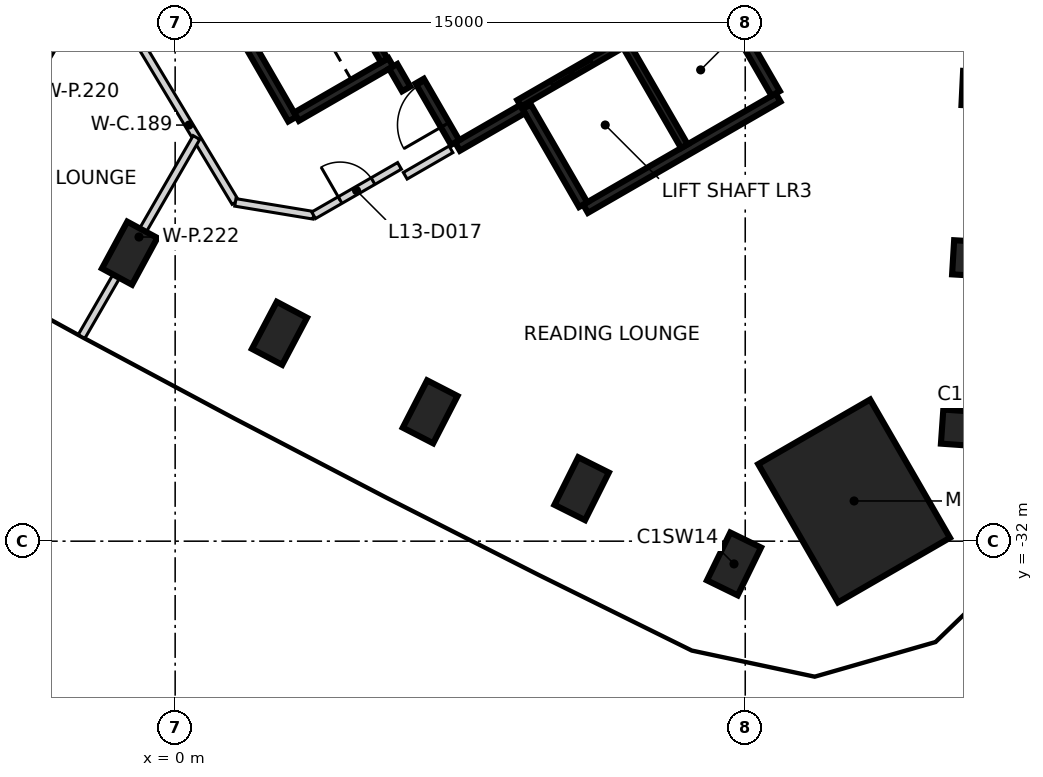
"""IFC4 building model, lengths in metres.
Left out: names, types, materials, properties, quantities, classifications, styles, units other than length and angle.
Written with IfcOpenShell. Run it as: python <this file> out.ifc"""

import sys

from ifc_helpers import new_model, si_unit, direction, frame, frame_2d, origin, origin_2d, place, context, subcontext, project, spatial, rectangle, extrude, element, fill, save


model = new_model("IFC4")
c1 = context("Model", 3, precision=1e-05, world=origin(), true_north=direction((0.0, 1.0)))
c2 = subcontext(c1, "Body", "Model", "MODEL_VIEW")
j1 = project(units=[si_unit("LENGTHUNIT", "METRE"), si_unit("PLANEANGLEUNIT", "RADIAN")], contexts=[c1])
p1 = place(None, origin())
s1 = spatial("IfcSite", under=j1, at=p1, CompositionType="ELEMENT")
p2 = place(p1, origin())
s2 = spatial("IfcBuilding", under=s1, at=p2, CompositionType="ELEMENT")
p3 = place(p2, frame((0.0, 0.0, 60.2)))
s3 = spatial("IfcBuildingStorey", under=s2, at=p3, CompositionType="ELEMENT", Elevation=60.2)
for number, where, z_axis, x_axis in (
    (1, (20.879, -29.034, -0.475), (0.0, 0.0, 1.0), (-0.998, 0.07, 0.0)),
    (2, (21.169, -24.573, -0.475), (0.0, 0.0, 1.0), (-0.998, 0.06, 0.0)),
    (3, (21.41, -20.109, -0.475), (0.0, 0.0, 1.0), (-0.999, 0.048, 0.0)),
    (4, (-1.197, -24.423, -0.475), (0.0, 0.0, 1.0), (0.476, 0.879, 0.0)),
    (5, (2.745, -26.531, -0.475), (0.0, 0.0, 1.0), (0.467, 0.884, 0.0)),
    (6, (6.71, -28.596, -0.475), (0.0, 0.0, 1.0), (0.458, 0.889, 0.0)),
    (7, (10.696, -30.619, -0.475), (0.0, 0.0, 1.0), (0.447, 0.894, 0.0)),
    (8, (14.705, -32.599, -0.475), (0.0, 0.0, 1.0), (0.438, 0.899, 0.0)),
):
    element("IfcColumn", number, at=place(p3, frame(where, z_axis=z_axis, x_axis=x_axis)), inside=s3, PredefinedType="COLUMN", context=c2, shape_type="SweptSolid", body=[
        extrude(rectangle(XDim=1.4, YDim=0.9, at=origin_2d()), origin(), (0.0, 0.0, 1.0), 3.6),
    ])
p4 = place(p3, frame((17.865, -30.942, -0.475), z_axis=(0.0, 0.0, 1.0), x_axis=(-0.5, 0.866025403784, 0.0)))
e9 = element("IfcColumn", 9, at=p4, inside=s3, PredefinedType="COLUMN", context=c2, shape_type="SweptSolid", body=[
    extrude(rectangle(XDim=4.2, YDim=3.4, at=origin_2d()), origin(), (0.0, 0.0, 1.0), 3.6),
])
p5 = place(p3, frame((15.865, -20.328, 0.0), z_axis=(0.0, 0.0, 1.0), x_axis=(-0.86602852612, -0.499994591916, 0.0)))
e10 = element("IfcWall", 10, at=p5, inside=s3, PredefinedType="SHEAR", context=c2, shape_type="SweptSolid", body=[
    extrude(rectangle(XDim=5.85, YDim=0.25, at=frame_2d((2.925, 0.0))), origin(), (0.0, 0.0, 1.0), 3.125),
])
for number, where, z_axis, x_axis in (
    (11, (14.315, -17.644, 0.0), (0.0, 0.0, 1.0), (0.5, -0.866, 0.0)),
    (12, (10.736, -23.145, 0.0), (0.0, 0.0, 1.0), (-0.5, 0.866, 0.0)),
):
    element("IfcWall", number, at=place(p3, frame(where, z_axis=z_axis, x_axis=x_axis)), inside=s3, PredefinedType="SHEAR", context=c2, shape_type="SweptSolid", body=[
        extrude(rectangle(XDim=2.974, YDim=0.25, at=frame_2d((1.487, 0.0))), origin(), (0.0, 0.0, 1.0), 3.125),
    ])
p6 = place(p3, frame((3.085, -20.894, 0.0), z_axis=(0.0, 0.0, 1.0), x_axis=(-0.499978833458, 0.866037623948, 0.0)))
e13 = element("IfcWall", 13, at=p6, inside=s3, PredefinedType="SHEAR", context=c2, shape_type="SweptSolid", body=[
    extrude(rectangle(XDim=3.05, YDim=0.25, at=frame_2d((1.525, 0.0))), origin(), (0.0, 0.0, 1.0), 3.125),
])
p7 = place(p3, frame((5.675, -19.399, 0.0), z_axis=(0.0, 0.0, 1.0), x_axis=(-0.866026637627, -0.499997862916, 0.0)))
e14 = element("IfcWall", 14, at=p7, inside=s3, PredefinedType="SHEAR", context=c2, shape_type="SweptSolid", body=[
    extrude(rectangle(XDim=2.865, YDim=0.25, at=frame_2d((1.432, 0.0))), origin(), (0.0, 0.0, 1.0), 3.125),
])
p8 = place(p3, frame((9.14, -20.631, 0.0), z_axis=(0.0, 0.0, 1.0), x_axis=(-0.866043531843, -0.499968599967, 0.0)))
e15 = element("IfcWall", 15, at=p8, inside=s3, PredefinedType="SHEAR", context=c2, shape_type="SweptSolid", body=[
    extrude(rectangle(XDim=1.975, YDim=0.25, at=frame_2d((0.987, 0.0))), origin(), (0.0, 0.0, 1.0), 3.125),
])
p9 = place(p3, frame((7.367, -21.51, 0.0), z_axis=(0.0, 0.0, 1.0), x_axis=(-0.499983108224, 0.866035156036, 0.0)))
e16 = element("IfcWall", 16, at=p9, inside=s3, PredefinedType="SHEAR", context=c2, shape_type="SweptSolid", body=[
    extrude(rectangle(XDim=1.865, YDim=0.25, at=frame_2d((0.932, 0.0))), origin(), (0.0, 0.0, 1.0), 3.125),
])
p10 = place(p9, frame((0.535, 0.0, 0.0)))
e17 = element("IfcOpeningElement", 17, at=p10, cuts=e16, PredefinedType="OPENING", context=c2, shape_type="SweptSolid", body=[
    extrude(rectangle(XDim=1.25, YDim=2.1, at=frame_2d((0.625, 1.05))), frame((0.0, 0.135, 0.0), z_axis=(0.0, -1.0, 0.0), x_axis=(1.0, 0.0, 0.0)), (0.0, 0.0, 1.0), 0.27),
])
p11 = place(p3, frame((6.08, -20.1, 0.0), z_axis=(0.0, 0.0, 1.0), x_axis=(-0.500051773299, 0.865995510393, 0.0)))
e18 = element("IfcWall", 18, at=p11, inside=s3, PredefinedType="SHEAR", context=c2, shape_type="SweptSolid", body=[
    extrude(rectangle(XDim=0.685, YDim=0.25, at=frame_2d((0.342, 0.0))), origin(), (0.0, 0.0, 1.0), 3.125),
])
p12 = place(p3, frame((9.052, -20.48, 0.0), z_axis=(0.0, 0.0, 1.0), x_axis=(0.866030299012, 0.499991521122, 0.0)))
e19 = element("IfcWall", 19, at=p12, inside=s3, PredefinedType="SHEAR", context=c2, shape_type="SweptSolid", body=[
    extrude(rectangle(XDim=6.1, YDim=0.2, at=frame_2d((3.05, 0.0))), origin(), (0.0, 0.0, 1.0), 3.125),
])
p13 = place(p12, frame((1.0, 0.0, 0.0)))
e20 = element("IfcOpeningElement", 20, at=p13, cuts=e19, PredefinedType="OPENING", context=c2, shape_type="SweptSolid", body=[
    extrude(rectangle(XDim=1.2, YDim=2.1, at=frame_2d((0.6, 1.05))), frame((0.0, 0.11, 0.0), z_axis=(0.0, -1.0, 0.0), x_axis=(1.0, 0.0, 0.0)), (0.0, 0.0, 1.0), 0.22),
])
p14 = place(p12, frame((4.05, 0.0, 0.0)))
e21 = element("IfcOpeningElement", 21, at=p14, cuts=e19, PredefinedType="OPENING", context=c2, shape_type="SweptSolid", body=[
    extrude(rectangle(XDim=1.2, YDim=2.1, at=frame_2d((0.6, 1.05))), frame((0.0, 0.11, 0.0), z_axis=(0.0, -1.0, 0.0), x_axis=(1.0, 0.0, 0.0)), (0.0, 0.0, 1.0), 0.22),
])
p15 = place(p3, frame((11.875, -18.967, 0.0), z_axis=(0.0, 0.0, 1.0), x_axis=(0.49998131003, -0.866036194175, 0.0)))
e22 = element("IfcWall", 22, at=p15, inside=s3, PredefinedType="SHEAR", context=c2, shape_type="SweptSolid", body=[
    extrude(rectangle(XDim=3.048, YDim=0.2, at=frame_2d((1.524, 0.0))), origin(), (0.0, 0.0, 1.0), 3.125),
])
p16 = place(p3, frame((5.503, -19.352, 0.0), z_axis=(0.0, 0.0, 1.0), x_axis=(-0.499986818241, 0.866033014143, 0.0)))
e23 = element("IfcWall", 23, at=p16, inside=s3, PredefinedType="SHEAR", context=c2, shape_type="SweptSolid", body=[
    extrude(rectangle(XDim=2.798, YDim=0.2, at=frame_2d((1.399, 0.0))), origin(), (0.0, 0.0, 1.0), 3.125),
])
p17 = place(p16, frame((0.949, 0.0, 0.0)))
e24 = element("IfcOpeningElement", 24, at=p17, cuts=e23, PredefinedType="OPENING", context=c2, shape_type="SweptSolid", body=[
    extrude(rectangle(XDim=0.9, YDim=2.1, at=frame_2d((0.45, 1.05))), frame((0.0, 0.11, 0.0), z_axis=(0.0, -1.0, 0.0), x_axis=(1.0, 0.0, 0.0)), (0.0, 0.0, 1.0), 0.22),
])
p18 = place(p3, frame((-0.858, -19.017, 0.0), z_axis=(0.0, 0.0, 1.0), x_axis=(0.514647068805, -0.857402119528, 0.0)))
e25 = element("IfcWall", 25, at=p18, inside=s3, PredefinedType="PARTITIONING", context=c2, shape_type="SweptSolid", body=[
    extrude(rectangle(XDim=4.745, YDim=0.2, at=frame_2d((2.373, 0.0))), origin(), (0.0, 0.0, 1.0), 3.125),
])
p19 = place(p3, frame((1.584, -23.086, 0.0), z_axis=(0.0, 0.0, 1.0), x_axis=(0.986633159246, -0.162957077405, 0.0)))
e26 = element("IfcWall", 26, at=p19, inside=s3, PredefinedType="PARTITIONING", context=c2, shape_type="SweptSolid", body=[
    extrude(rectangle(XDim=2.087, YDim=0.2, at=frame_2d((1.043, 0.0))), origin(), (0.0, 0.0, 1.0), 3.125),
])
p20 = place(p3, frame((3.643, -23.426, 0.0), z_axis=(0.0, 0.0, 1.0), x_axis=(0.866654350985, 0.498909045738, 0.0)))
e27 = element("IfcWall", 27, at=p20, inside=s3, PredefinedType="PARTITIONING", context=c2, shape_type="SweptSolid", body=[
    extrude(rectangle(XDim=2.608, YDim=0.2, at=frame_2d((1.304, 0.0))), origin(), (0.0, 0.0, 1.0), 3.125),
])
p21 = place(p20, frame((0.804, 0.0, 0.0)))
e28 = element("IfcOpeningElement", 28, at=p21, cuts=e27, PredefinedType="OPENING", context=c2, shape_type="SweptSolid", body=[
    extrude(rectangle(XDim=1.0, YDim=2.1, at=frame_2d((0.5, 1.05))), frame((0.0, 0.11, 0.0), z_axis=(0.0, -1.0, 0.0), x_axis=(1.0, 0.0, 0.0)), (0.0, 0.0, 1.0), 0.22),
])
p22 = place(p3, frame((6.054, -22.385, 0.0), z_axis=(0.0, 0.0, 1.0), x_axis=(0.86593101922, 0.500163443238, 0.0)))
e29 = element("IfcWall", 29, at=p22, inside=s3, PredefinedType="PARTITIONING", context=c2, shape_type="SweptSolid", body=[
    extrude(rectangle(XDim=1.39, YDim=0.2, at=frame_2d((0.695, 0.0))), origin(), (0.0, 0.0, 1.0), 3.125),
])
p23 = place(p3, frame((-10.276, -22.271, 0.0), z_axis=(0.0, 0.0, 1.0), x_axis=(0.49999372146, 0.866029028671, 0.0)))
e30 = element("IfcWall", 30, at=p23, inside=s3, PredefinedType="PARTITIONING", context=c2, shape_type="SweptSolid", body=[
    extrude(rectangle(XDim=17.425, YDim=0.2, at=frame_2d((8.712, 0.0))), origin(), (0.0, 0.0, 1.0), 3.125),
])
p24 = place(p3, frame((-6.381, -24.464, 0.0), z_axis=(0.0, 0.0, 1.0), x_axis=(0.500007577232, 0.866021029023, 0.0)))
e31 = element("IfcWall", 31, at=p24, inside=s3, PredefinedType="PARTITIONING", context=c2, shape_type="SweptSolid", body=[
    extrude(rectangle(XDim=9.883, YDim=0.2, at=frame_2d((4.941, 0.0))), origin(), (0.0, 0.0, 1.0), 3.125),
])
p25 = place(p3, frame((-2.462, -26.615, 0.0), z_axis=(0.0, 0.0, 1.0), x_axis=(0.49992636536, 0.86606791259, 0.0)))
e32 = element("IfcWall", 32, at=p25, inside=s3, PredefinedType="PARTITIONING", context=c2, shape_type="SweptSolid", body=[
    extrude(rectangle(XDim=6.046, YDim=0.2, at=frame_2d((3.023, 0.0))), origin(), (0.0, 0.0, 1.0), 3.125),
])
p26 = place(p13, origin())
e33 = element("IfcDoor", 33, at=p26, inside=s3, OperationType="DOUBLE_DOOR_SLIDING", PredefinedType="DOOR", context=c2, shape_type="SweptSolid", body=[
    extrude(rectangle(XDim=1.2, YDim=2.1, at=frame_2d((0.6, 1.05))), frame((0.0, 0.025, 0.0), z_axis=(0.0, -1.0, 0.0), x_axis=(1.0, 0.0, 0.0)), (0.0, 0.0, 1.0), 0.05),
])
fill(e20, e33)
p27 = place(p10, origin())
e34 = element("IfcDoor", 34, at=p27, inside=s3, OperationType="SINGLE_SWING_LEFT", PredefinedType="DOOR", context=c2, shape_type="SweptSolid", body=[
    extrude(rectangle(XDim=1.25, YDim=2.1, at=frame_2d((0.625, 1.05))), frame((0.0, 0.025, 0.0), z_axis=(0.0, -1.0, 0.0), x_axis=(1.0, 0.0, 0.0)), (0.0, 0.0, 1.0), 0.05),
])
fill(e17, e34)
p28 = place(p21, frame((1.0, 0.0, 0.0), z_axis=(0.0, 0.0, 1.0), x_axis=(-1.0, 0.0, 0.0)))
e35 = element("IfcDoor", 35, at=p28, inside=s3, OperationType="SINGLE_SWING_LEFT", PredefinedType="DOOR", context=c2, shape_type="SweptSolid", body=[
    extrude(rectangle(XDim=1.0, YDim=2.1, at=frame_2d((0.5, 1.05))), frame((0.0, 0.025, 0.0), z_axis=(0.0, -1.0, 0.0), x_axis=(1.0, 0.0, 0.0)), (0.0, 0.0, 1.0), 0.05),
])
fill(e28, e35)
save(model, sys.argv[1])
